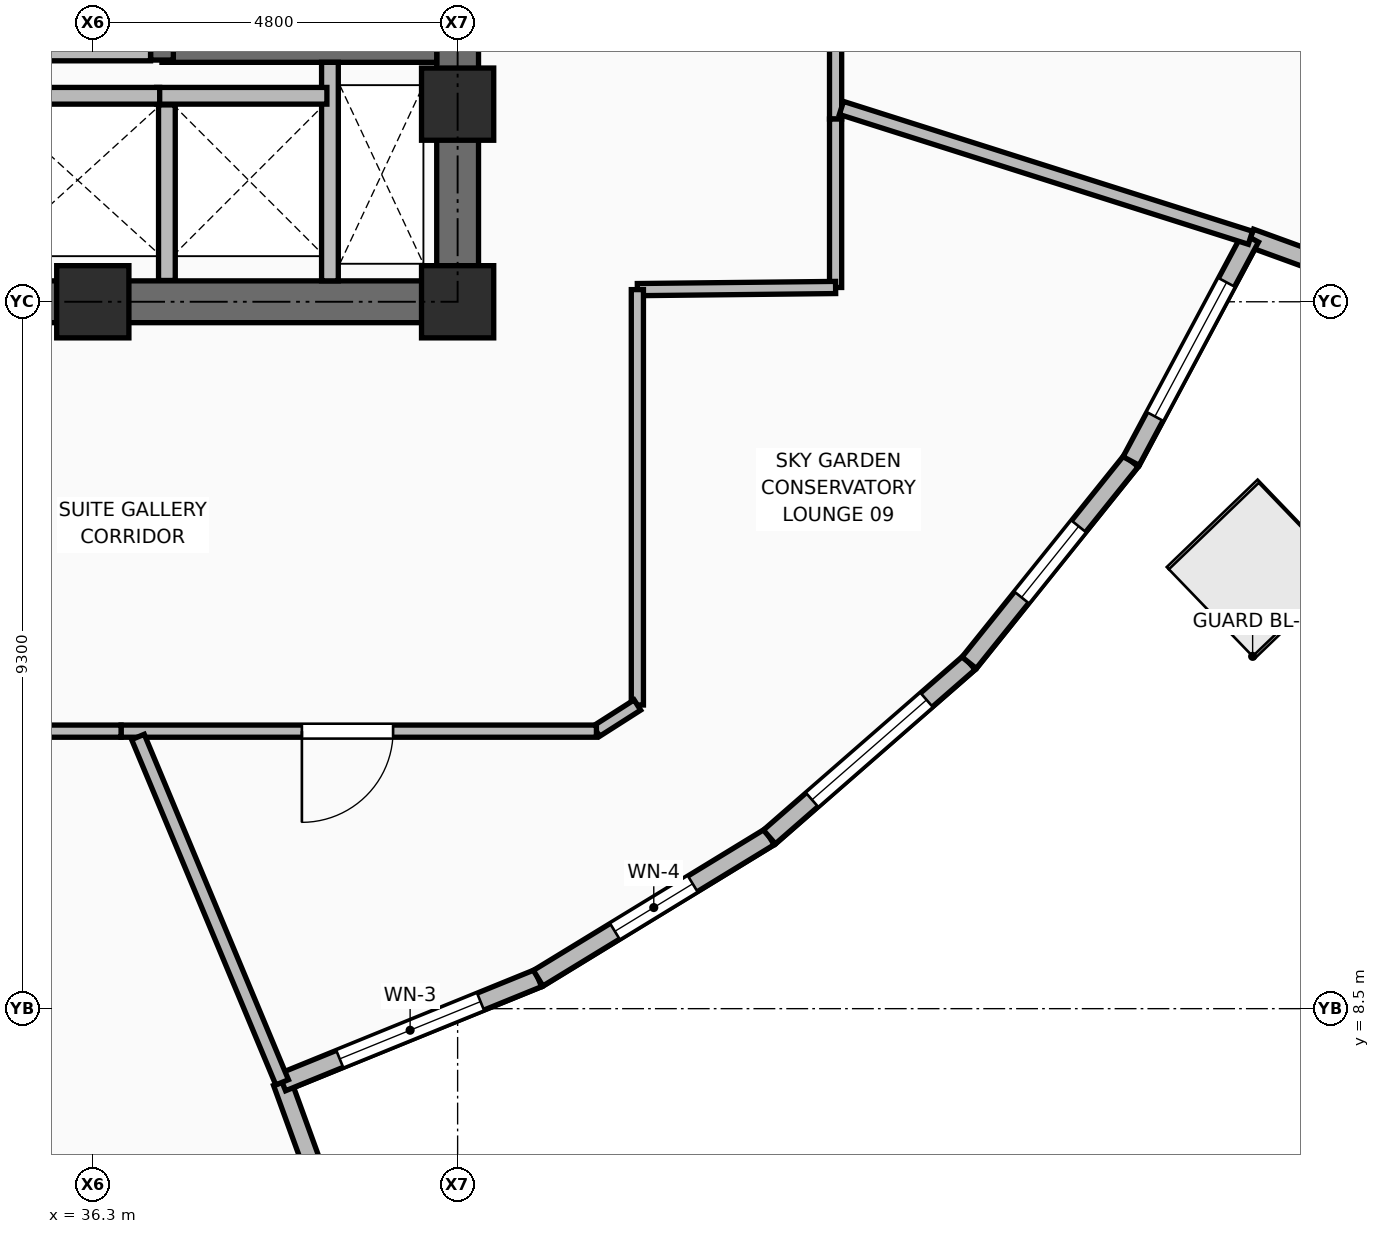
"""IFC4 building model, lengths in metres.
Left out: names, types, materials, properties, quantities, classifications, styles, units other than length and angle.
Written with IfcOpenShell. Run it as: python <this file> out.ifc"""

import sys

from ifc_helpers import new_model, si_unit, direction, frame, frame_2d, origin, origin_2d, place, context, subcontext, project, spatial, rectangle, extrude, element, fill, save


model = new_model("IFC4")
c1 = context("Model", 3, precision=1e-05, world=origin(), true_north=direction((0.0, 1.0)))
c2 = subcontext(c1, "Body", "Model", "MODEL_VIEW")
j1 = project(units=[si_unit("LENGTHUNIT", "METRE"), si_unit("PLANEANGLEUNIT", "RADIAN")], contexts=[c1])
p1 = place(None, origin())
s1 = spatial("IfcSite", under=j1, at=p1, CompositionType="ELEMENT")
p2 = place(p1, origin())
s2 = spatial("IfcBuilding", under=s1, at=p2, CompositionType="ELEMENT")
p3 = place(p2, frame((0.0, 0.0, 142.2)))
s3 = spatial("IfcBuildingStorey", under=s2, at=p3, CompositionType="ELEMENT", Elevation=142.2)
for number, where, z_axis, x_axis in (
    (1, (36.3, 17.8, 0.0), (0.0, 0.0, 1.0), (1.0, 0.0, 0.0)),
    (2, (41.1, 17.8, 0.0), (0.0, 0.0, 1.0), (1.0, 0.0, 0.0)),
    (3, (41.1, 20.4, 0.0), (0.0, 0.0, 1.0), (1.0, 0.0, 0.0)),
):
    element("IfcColumn", number, at=place(p3, frame(where, z_axis=z_axis, x_axis=x_axis)), inside=s3, PredefinedType="COLUMN", context=c2, shape_type="SweptSolid", body=[
        extrude(rectangle(XDim=0.95, YDim=0.95, at=origin_2d()), origin(), (0.0, 0.0, 1.0), 3.75),
    ])
p4 = place(p3, frame((37.275, 18.08, 0.0), z_axis=(0.0, 0.0, 1.0), x_axis=(0.0, 1.0, 0.0)))
e4 = element("IfcWall", 4, at=p4, inside=s3, PredefinedType="PARTITIONING", context=c2, shape_type="SweptSolid", body=[
    extrude(rectangle(XDim=2.31, YDim=0.22, at=frame_2d((1.155, 0.0))), origin(), (0.0, 0.0, 1.0), 3.545),
])
for number, where, z_axis, x_axis in (
    (5, (40.159, 3.772, 0.0), (0.0, 0.0, 1.0), (-0.342, 0.94, 0.0)),
    (6, (51.531, 18.642, 0.0), (0.0, 0.0, 1.0), (0.94, -0.342, 0.0)),
):
    element("IfcWall", number, at=place(p3, frame(where, z_axis=z_axis, x_axis=x_axis)), inside=s3, PredefinedType="SOLIDWALL", context=c2, shape_type="SweptSolid", body=[
        extrude(rectangle(XDim=4.0, YDim=0.24, at=frame_2d((2.0, 0.0))), origin(), (0.0, 0.0, 1.0), 3.57),
    ])
p5 = place(p3, frame((38.791, 7.531, 0.0), z_axis=(0.0, 0.0, 1.0), x_axis=(0.926307714527, 0.37676785692, 0.0)))
e7 = element("IfcWall", 7, at=p5, inside=s3, PredefinedType="SOLIDWALL", context=c2, shape_type="SweptSolid", body=[
    extrude(rectangle(XDim=3.636, YDim=0.24, at=frame_2d((1.818, 0.0))), origin(), (0.0, 0.0, 1.0), 3.57),
])
p6 = place(p5, frame((0.818, 0.0, 0.85)))
e8 = element("IfcOpeningElement", 8, at=p6, cuts=e7, PredefinedType="OPENING", context=c2, shape_type="SweptSolid", body=[
    extrude(rectangle(XDim=2.0, YDim=2.4, at=frame_2d((1.0, 1.2))), frame((0.0, 0.13, 0.0), z_axis=(0.0, -1.0, 0.0), x_axis=(1.0, 0.0, 0.0)), (0.0, 0.0, 1.0), 0.26),
])
p7 = place(p3, frame((42.159, 8.901, 0.0), z_axis=(0.0, 0.0, 1.0), x_axis=(0.853461200676, 0.52115638626, 0.0)))
e9 = element("IfcWall", 9, at=p7, inside=s3, PredefinedType="SOLIDWALL", context=c2, shape_type="SweptSolid", body=[
    extrude(rectangle(XDim=3.565, YDim=0.24, at=frame_2d((1.783, 0.0))), origin(), (0.0, 0.0, 1.0), 3.57),
])
p8 = place(p7, frame((1.183, 0.0, 0.85)))
e10 = element("IfcOpeningElement", 10, at=p8, cuts=e9, PredefinedType="OPENING", context=c2, shape_type="SweptSolid", body=[
    extrude(rectangle(XDim=1.2, YDim=1.8, at=frame_2d((0.6, 0.9))), frame((0.0, 0.13, 0.0), z_axis=(0.0, -1.0, 0.0), x_axis=(1.0, 0.0, 0.0)), (0.0, 0.0, 1.0), 0.26),
])
p9 = place(p3, frame((45.202, 10.759, 0.0), z_axis=(0.0, 0.0, 1.0), x_axis=(0.753664238494, 0.65725962573, 0.0)))
e11 = element("IfcWall", 11, at=p9, inside=s3, PredefinedType="SOLIDWALL", context=c2, shape_type="SweptSolid", body=[
    extrude(rectangle(XDim=3.487, YDim=0.24, at=frame_2d((1.744, 0.0))), origin(), (0.0, 0.0, 1.0), 3.57),
])
p10 = place(p9, frame((0.744, 0.0, 0.85)))
e12 = element("IfcOpeningElement", 12, at=p10, cuts=e11, PredefinedType="OPENING", context=c2, shape_type="SweptSolid", body=[
    extrude(rectangle(XDim=2.0, YDim=2.4, at=frame_2d((1.0, 1.2))), frame((0.0, 0.13, 0.0), z_axis=(0.0, -1.0, 0.0), x_axis=(1.0, 0.0, 0.0)), (0.0, 0.0, 1.0), 0.26),
])
p11 = place(p3, frame((47.83, 13.051, 0.0), z_axis=(0.0, 0.0, 1.0), x_axis=(0.626058711575, 0.779775922724, 0.0)))
e13 = element("IfcWall", 13, at=p11, inside=s3, PredefinedType="SOLIDWALL", context=c2, shape_type="SweptSolid", body=[
    extrude(rectangle(XDim=3.404, YDim=0.24, at=frame_2d((1.702, 0.0))), origin(), (0.0, 0.0, 1.0), 3.57),
])
p12 = place(p11, frame((1.102, 0.0, 0.85)))
e14 = element("IfcOpeningElement", 14, at=p12, cuts=e13, PredefinedType="OPENING", context=c2, shape_type="SweptSolid", body=[
    extrude(rectangle(XDim=1.2, YDim=1.8, at=frame_2d((0.6, 0.9))), frame((0.0, 0.13, 0.0), z_axis=(0.0, -1.0, 0.0), x_axis=(1.0, 0.0, 0.0)), (0.0, 0.0, 1.0), 0.26),
])
p13 = place(p3, frame((49.961, 15.705, 0.0), z_axis=(0.0, 0.0, 1.0), x_axis=(0.471444120002, 0.881895935877, 0.0)))
e15 = element("IfcWall", 15, at=p13, inside=s3, PredefinedType="SOLIDWALL", context=c2, shape_type="SweptSolid", body=[
    extrude(rectangle(XDim=3.33, YDim=0.24, at=frame_2d((1.665, 0.0))), origin(), (0.0, 0.0, 1.0), 3.57),
])
p14 = place(p13, frame((0.665, 0.0, 0.85)))
e16 = element("IfcOpeningElement", 16, at=p14, cuts=e15, PredefinedType="OPENING", context=c2, shape_type="SweptSolid", body=[
    extrude(rectangle(XDim=2.0, YDim=2.4, at=frame_2d((1.0, 1.2))), frame((0.0, 0.13, 0.0), z_axis=(0.0, -1.0, 0.0), x_axis=(1.0, 0.0, 0.0)), (0.0, 0.0, 1.0), 0.26),
])
p15 = place(p3, frame((34.95, 17.8, 0.0), z_axis=(0.0, 0.0, 1.0), x_axis=(1.0, 0.0, 0.0)))
e17 = element("IfcWall", 17, at=p15, inside=s3, PredefinedType="SHEAR", context=c2, shape_type="SweptSolid", body=[
    extrude(rectangle(XDim=6.425, YDim=0.55, at=frame_2d((3.212, 0.0))), origin(), (0.0, 0.0, 1.0), 3.57),
])
p16 = place(p3, frame((41.1, 18.075, 0.0), z_axis=(0.0, 0.0, 1.0), x_axis=(0.0, 1.0, 0.0)))
e18 = element("IfcWall", 18, at=p16, inside=s3, PredefinedType="SHEAR", context=c2, shape_type="SweptSolid", body=[
    extrude(rectangle(XDim=14.1, YDim=0.55, at=frame_2d((7.05, 0.0))), origin(), (0.0, 0.0, 1.0), 3.57),
])
p17 = place(p16, frame((3.385, 0.0, 0.0)))
e19 = element("IfcOpeningElement", 19, at=p17, cuts=e18, PredefinedType="OPENING", context=c2, shape_type="SweptSolid", body=[
    extrude(rectangle(XDim=1.05, YDim=2.1, at=frame_2d((0.525, 1.05))), frame((0.0, 0.285, 0.0), z_axis=(0.0, -1.0, 0.0), x_axis=(1.0, 0.0, 0.0)), (0.0, 0.0, 1.0), 0.57),
])
p18 = place(p3, frame((37.21, 21.1, 0.0), z_axis=(0.0, 0.0, 1.0), x_axis=(1.0, 0.0, 0.0)))
e20 = element("IfcWall", 20, at=p18, inside=s3, PredefinedType="SHEAR", context=c2, shape_type="SweptSolid", body=[
    extrude(rectangle(XDim=3.615, YDim=0.3, at=frame_2d((1.808, 0.0))), origin(), (0.0, 0.0, 1.0), 3.57),
])
p19 = place(p3, frame((37.21, 20.98, 0.0), z_axis=(0.0, 0.0, 1.0), x_axis=(0.0, 1.0, 0.0)))
e21 = element("IfcWall", 21, at=p19, inside=s3, PredefinedType="SHEAR", context=c2, shape_type="SweptSolid", body=[
    extrude(rectangle(XDim=7.99, YDim=0.3, at=frame_2d((3.995, 0.0))), origin(), (0.0, 0.0, 1.0), 3.57),
])
p20 = place(p3, frame((39.42, 18.075, 0.0), z_axis=(0.0, 0.0, 1.0), x_axis=(0.0, 1.0, 0.0)))
e22 = element("IfcWall", 22, at=p20, inside=s3, PredefinedType="PARTITIONING", context=c2, shape_type="SweptSolid", body=[
    extrude(rectangle(XDim=2.875, YDim=0.22, at=frame_2d((1.438, 0.0))), origin(), (0.0, 0.0, 1.0), 3.55),
])
for number, where, z_axis, x_axis in (
    (23, (37.14, 20.51, 0.0), (0.0, 0.0, 1.0), (1.0, 0.0, 0.0)),
    (24, (34.94, 20.51, 0.0), (0.0, 0.0, 1.0), (1.0, 0.0, 0.0)),
):
    element("IfcWall", number, at=place(p3, frame(where, z_axis=z_axis, x_axis=x_axis)), inside=s3, PredefinedType="PARTITIONING", context=c2, shape_type="SweptSolid", body=[
        extrude(rectangle(XDim=2.24, YDim=0.22, at=frame_2d((1.12, 0.0))), origin(), (0.0, 0.0, 1.0), 3.55),
    ])
p21 = place(p3, frame((35.12, 21.08, 0.0), z_axis=(0.0, 0.0, 1.0), x_axis=(1.0, 0.0, 0.0)))
e25 = element("IfcWall", 25, at=p21, inside=s3, PredefinedType="PARTITIONING", context=c2, shape_type="SweptSolid", body=[
    extrude(rectangle(XDim=1.94, YDim=0.22, at=frame_2d((0.97, 0.0))), origin(), (0.0, 0.0, 1.0), 3.55),
])
p22 = place(p3, frame((46.073, 25.23, 0.0), z_axis=(0.0, 0.0, 1.0), x_axis=(0.0, -1.0, 0.0)))
e26 = element("IfcWall", 26, at=p22, inside=s3, PredefinedType="PARTITIONING", context=c2, shape_type="SweptSolid", body=[
    extrude(rectangle(XDim=5.026, YDim=0.16, at=frame_2d((2.513, 0.0))), origin(), (0.0, 0.0, 1.0), 3.006),
])
p23 = place(p22, frame((1.767, 0.0, 0.0)))
e27 = element("IfcOpeningElement", 27, at=p23, cuts=e26, PredefinedType="OPENING", context=c2, shape_type="SweptSolid", body=[
    extrude(rectangle(XDim=1.2, YDim=2.1, at=frame_2d((0.6, 1.05))), frame((0.0, 0.09, 0.0), z_axis=(0.0, -1.0, 0.0), x_axis=(1.0, 0.0, 0.0)), (0.0, 0.0, 1.0), 0.18),
])
p24 = place(p3, frame((46.073, 20.204, 0.0), z_axis=(0.0, 0.0, 1.0), x_axis=(0.0, -1.0, 0.0)))
e28 = element("IfcWall", 28, at=p24, inside=s3, PredefinedType="PARTITIONING", context=c2, shape_type="SweptSolid", body=[
    extrude(rectangle(XDim=2.216, YDim=0.16, at=frame_2d((1.108, 0.0))), origin(), (0.0, 0.0, 1.0), 3.55),
])
p25 = place(p3, frame((46.073, 17.988, 0.0), z_axis=(0.0, 0.0, 1.0), x_axis=(-0.99994205409, -0.010765150367, 0.0)))
e29 = element("IfcWall", 29, at=p25, inside=s3, PredefinedType="PARTITIONING", context=c2, shape_type="SweptSolid", body=[
    extrude(rectangle(XDim=2.608, YDim=0.16, at=frame_2d((1.304, 0.0))), origin(), (0.0, 0.0, 1.0), 3.55),
])
p26 = place(p3, frame((43.465, 17.96, 0.0), z_axis=(0.0, 0.0, 1.0), x_axis=(0.0, -1.0, 0.0)))
e30 = element("IfcWall", 30, at=p26, inside=s3, PredefinedType="PARTITIONING", context=c2, shape_type="SweptSolid", body=[
    extrude(rectangle(XDim=5.465, YDim=0.16, at=frame_2d((2.732, 0.0))), origin(), (0.0, 0.0, 1.0), 3.006),
])
p27 = place(p3, frame((43.465, 12.495, 0.0), z_axis=(0.0, 0.0, 1.0), x_axis=(-0.842811694093, -0.538208554652, 0.0)))
e31 = element("IfcWall", 31, at=p27, inside=s3, PredefinedType="PARTITIONING", context=c2, shape_type="SweptSolid", body=[
    extrude(rectangle(XDim=0.64, YDim=0.16, at=frame_2d((0.32, 0.0))), origin(), (0.0, 0.0, 1.0), 3.55),
])
p28 = place(p3, frame((42.926, 12.151, 0.0), z_axis=(0.0, 0.0, 1.0), x_axis=(-1.0, 0.0, 0.0)))
e32 = element("IfcWall", 32, at=p28, inside=s3, PredefinedType="PARTITIONING", context=c2, shape_type="SweptSolid", body=[
    extrude(rectangle(XDim=6.254, YDim=0.16, at=frame_2d((3.127, 0.0))), origin(), (0.0, 0.0, 1.0), 3.006),
])
p29 = place(p28, frame((2.675, 0.0, 0.0)))
e33 = element("IfcOpeningElement", 33, at=p29, cuts=e32, PredefinedType="OPENING", context=c2, shape_type="SweptSolid", body=[
    extrude(rectangle(XDim=1.2, YDim=2.1, at=frame_2d((0.6, 1.05))), frame((0.0, 0.09, 0.0), z_axis=(0.0, -1.0, 0.0), x_axis=(1.0, 0.0, 0.0)), (0.0, 0.0, 1.0), 0.18),
])
p30 = place(p3, frame((36.672, 12.151, 0.0), z_axis=(0.0, 0.0, 1.0), x_axis=(-1.0, 0.0, 0.0)))
e34 = element("IfcWall", 34, at=p30, inside=s3, PredefinedType="PARTITIONING", context=c2, shape_type="SweptSolid", body=[
    extrude(rectangle(XDim=10.913, YDim=0.16, at=frame_2d((5.457, 0.0))), origin(), (0.0, 0.0, 1.0), 3.006),
])
p31 = place(p30, frame((4.782, 0.0, 0.0)))
e35 = element("IfcOpeningElement", 35, at=p31, cuts=e34, PredefinedType="OPENING", context=c2, shape_type="SweptSolid", body=[
    extrude(rectangle(XDim=1.2, YDim=2.1, at=frame_2d((0.6, 1.05))), frame((0.0, 0.09, 0.0), z_axis=(0.0, -1.0, 0.0), x_axis=(1.0, 0.0, 0.0)), (0.0, 0.0, 1.0), 0.18),
])
p32 = place(p3, frame((36.894, 12.075, 0.0), z_axis=(0.0, 0.0, 1.0), x_axis=(0.385248999584, -0.922812661551, 0.0)))
e36 = element("IfcWall", 36, at=p32, inside=s3, PredefinedType="PARTITIONING", context=c2, shape_type="SweptSolid", body=[
    extrude(rectangle(XDim=4.924, YDim=0.18, at=frame_2d((2.462, 0.0))), origin(), (0.0, 0.0, 1.0), 3.55),
])
p33 = place(p3, frame((46.15, 20.35, 0.0), z_axis=(0.0, 0.0, 1.0), x_axis=(0.953138519051, -0.302534235256, 0.0)))
e37 = element("IfcWall", 37, at=p33, inside=s3, PredefinedType="PARTITIONING", context=c2, shape_type="SweptSolid", body=[
    extrude(rectangle(XDim=5.646, YDim=0.18, at=frame_2d((2.823, 0.0))), origin(), (0.0, 0.0, 1.0), 3.55),
])
p34 = place(p6, origin())
e38 = element("IfcWindow", 38, at=p34, inside=s3, PartitioningType="SINGLE_PANEL", PredefinedType="WINDOW", context=c2, shape_type="SweptSolid", body=[
    extrude(rectangle(XDim=2.0, YDim=2.4, at=frame_2d((1.0, 1.2))), frame((0.0, 0.03, 0.0), z_axis=(0.0, -1.0, 0.0), x_axis=(1.0, 0.0, 0.0)), (0.0, 0.0, 1.0), 0.06),
])
fill(e8, e38)
p35 = place(p8, origin())
e39 = element("IfcWindow", 39, at=p35, inside=s3, PartitioningType="SINGLE_PANEL", PredefinedType="WINDOW", context=c2, shape_type="SweptSolid", body=[
    extrude(rectangle(XDim=1.2, YDim=1.8, at=frame_2d((0.6, 0.9))), frame((0.0, 0.03, 0.0), z_axis=(0.0, -1.0, 0.0), x_axis=(1.0, 0.0, 0.0)), (0.0, 0.0, 1.0), 0.06),
])
fill(e10, e39)
p36 = place(p10, origin())
e40 = element("IfcWindow", 40, at=p36, inside=s3, PartitioningType="SINGLE_PANEL", PredefinedType="WINDOW", context=c2, shape_type="SweptSolid", body=[
    extrude(rectangle(XDim=2.0, YDim=2.4, at=frame_2d((1.0, 1.2))), frame((0.0, 0.03, 0.0), z_axis=(0.0, -1.0, 0.0), x_axis=(1.0, 0.0, 0.0)), (0.0, 0.0, 1.0), 0.06),
])
fill(e12, e40)
p37 = place(p12, origin())
e41 = element("IfcWindow", 41, at=p37, inside=s3, PartitioningType="SINGLE_PANEL", PredefinedType="WINDOW", context=c2, shape_type="SweptSolid", body=[
    extrude(rectangle(XDim=1.2, YDim=1.8, at=frame_2d((0.6, 0.9))), frame((0.0, 0.03, 0.0), z_axis=(0.0, -1.0, 0.0), x_axis=(1.0, 0.0, 0.0)), (0.0, 0.0, 1.0), 0.06),
])
fill(e14, e41)
p38 = place(p14, origin())
e42 = element("IfcWindow", 42, at=p38, inside=s3, PartitioningType="SINGLE_PANEL", PredefinedType="WINDOW", context=c2, shape_type="SweptSolid", body=[
    extrude(rectangle(XDim=2.0, YDim=2.4, at=frame_2d((1.0, 1.2))), frame((0.0, 0.03, 0.0), z_axis=(0.0, -1.0, 0.0), x_axis=(1.0, 0.0, 0.0)), (0.0, 0.0, 1.0), 0.06),
])
fill(e16, e42)
p39 = place(p29, origin())
e43 = element("IfcDoor", 43, at=p39, inside=s3, OperationType="SINGLE_SWING_RIGHT", PredefinedType="DOOR", context=c2, shape_type="SweptSolid", body=[
    extrude(rectangle(XDim=1.2, YDim=2.1, at=frame_2d((0.6, 1.05))), frame((0.0, 0.025, 0.0), z_axis=(0.0, -1.0, 0.0), x_axis=(1.0, 0.0, 0.0)), (0.0, 0.0, 1.0), 0.05),
])
fill(e33, e43)
save(model, sys.argv[1])
